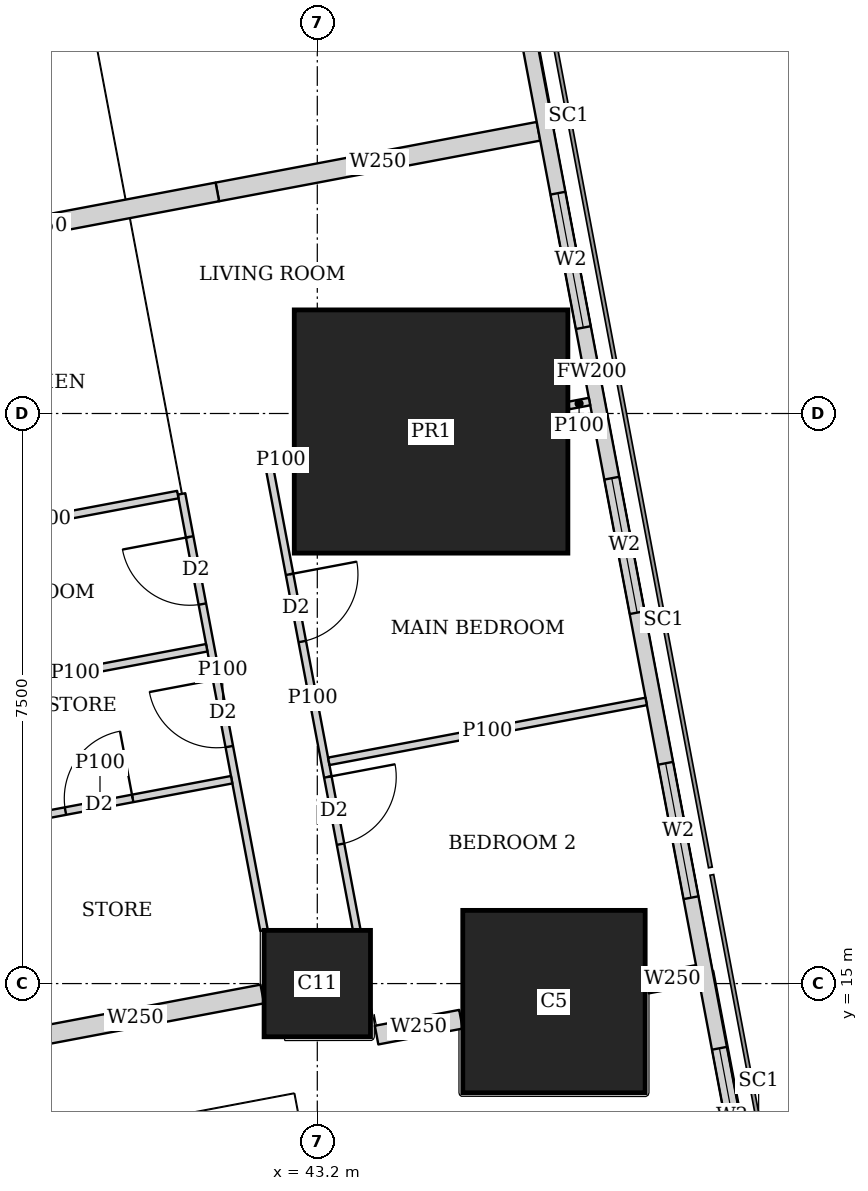
"""IFC4 building model, lengths in metres.
Left out: names, types, materials, properties, quantities, classifications, styles, units other than length and angle.
Written with IfcOpenShell. Run it as: python <this file> out.ifc"""

import sys

from ifc_helpers import new_model, si_unit, direction, frame, frame_2d, origin, origin_2d, place, context, subcontext, project, spatial, rectangle, extrude, element, fill, save


model = new_model("IFC4")
c1 = context("Model", 3, precision=1e-05, world=origin(), true_north=direction((0.0, 1.0)))
c2 = subcontext(c1, "Body", "Model", "MODEL_VIEW")
j1 = project(units=[si_unit("LENGTHUNIT", "METRE"), si_unit("PLANEANGLEUNIT", "RADIAN")], contexts=[c1])
p1 = place(None, origin())
s1 = spatial("IfcSite", under=j1, at=p1, CompositionType="ELEMENT")
p2 = place(p1, origin())
s2 = spatial("IfcBuilding", under=s1, at=p2, CompositionType="ELEMENT")
p3 = place(p2, frame((0.0, 0.0, 223.7)))
s3 = spatial("IfcBuildingStorey", under=s2, at=p3, CompositionType="ELEMENT", Elevation=223.7)
p4 = place(p3, frame((43.2, 15.0, 0.0), z_axis=(0.0, 0.0, 1.0), x_axis=(1.0, 0.0, 0.0)))
e1 = element("IfcColumn", 1, at=p4, inside=s3, PredefinedType="COLUMN", context=c2, shape_type="SweptSolid", body=[
    extrude(rectangle(XDim=1.4, YDim=1.4, at=origin_2d()), origin(), (0.0, 0.0, 1.0), 3.75),
])
p5 = place(p3, frame((46.314, 14.763, 0.0), z_axis=(0.0, 0.0, 1.0), x_axis=(1.0, 0.0, 0.0)))
e2 = element("IfcColumn", 2, at=p5, inside=s3, PredefinedType="COLUMN", context=c2, shape_type="SweptSolid", body=[
    extrude(rectangle(XDim=2.4, YDim=2.4, at=origin_2d()), origin(), (0.0, 0.0, 1.0), 3.75),
])
p6 = place(p3, frame((44.697, 22.263, 0.0), z_axis=(0.0, 0.0, 1.0), x_axis=(1.0, 0.0, 0.0)))
e3 = element("IfcColumn", 3, at=p6, inside=s3, PredefinedType="COLUMN", context=c2, shape_type="SweptSolid", body=[
    extrude(rectangle(XDim=3.6, YDim=3.2, at=origin_2d()), origin(), (0.0, 0.0, 1.0), 3.75),
])
p7 = place(p3, frame((50.653, 2.703, 0.0), z_axis=(0.0, 0.0, 1.0), x_axis=(-0.185612026696, 0.982623109613, 0.0)))
e4 = element("IfcWall", 4, at=p7, inside=s3, PredefinedType="SOLIDWALL", context=c2, shape_type="SweptSolid", body=[
    extrude(rectangle(XDim=41.393, YDim=0.2, at=frame_2d((20.697, 0.0))), origin(), (0.0, 0.0, 1.0), 3.5),
])
p8 = place(p7, frame((1.633, 0.0, 0.9)))
e5 = element("IfcOpeningElement", 5, at=p8, cuts=e4, PredefinedType="OPENING", context=c2, shape_type="SweptSolid", body=[
    extrude(rectangle(XDim=1.8, YDim=1.5, at=frame_2d((0.9, 0.75))), frame((0.0, 0.11, 0.0), z_axis=(0.0, -1.0, 0.0), x_axis=(1.0, 0.0, 0.0)), (0.0, 0.0, 1.0), 0.22),
])
p9 = place(p7, frame((6.032, 0.0, 0.9)))
e6 = element("IfcOpeningElement", 6, at=p9, cuts=e4, PredefinedType="OPENING", context=c2, shape_type="SweptSolid", body=[
    extrude(rectangle(XDim=1.8, YDim=1.5, at=frame_2d((0.9, 0.75))), frame((0.0, 0.11, 0.0), z_axis=(0.0, -1.0, 0.0), x_axis=(1.0, 0.0, 0.0)), (0.0, 0.0, 1.0), 0.22),
])
p10 = place(p7, frame((9.848, 0.0, 0.9)))
e7 = element("IfcOpeningElement", 7, at=p10, cuts=e4, PredefinedType="OPENING", context=c2, shape_type="SweptSolid", body=[
    extrude(rectangle(XDim=1.8, YDim=1.5, at=frame_2d((0.9, 0.75))), frame((0.0, 0.11, 0.0), z_axis=(0.0, -1.0, 0.0), x_axis=(1.0, 0.0, 0.0)), (0.0, 0.0, 1.0), 0.22),
])
p11 = place(p7, frame((13.664, 0.0, 0.9)))
e8 = element("IfcOpeningElement", 8, at=p11, cuts=e4, PredefinedType="OPENING", context=c2, shape_type="SweptSolid", body=[
    extrude(rectangle(XDim=1.8, YDim=1.5, at=frame_2d((0.9, 0.75))), frame((0.0, 0.11, 0.0), z_axis=(0.0, -1.0, 0.0), x_axis=(1.0, 0.0, 0.0)), (0.0, 0.0, 1.0), 0.22),
])
p12 = place(p7, frame((17.481, 0.0, 0.9)))
e9 = element("IfcOpeningElement", 9, at=p12, cuts=e4, PredefinedType="OPENING", context=c2, shape_type="SweptSolid", body=[
    extrude(rectangle(XDim=1.8, YDim=1.5, at=frame_2d((0.9, 0.75))), frame((0.0, 0.11, 0.0), z_axis=(0.0, -1.0, 0.0), x_axis=(1.0, 0.0, 0.0)), (0.0, 0.0, 1.0), 0.22),
])
p13 = place(p7, frame((21.297, 0.0, 0.9)))
e10 = element("IfcOpeningElement", 10, at=p13, cuts=e4, PredefinedType="OPENING", context=c2, shape_type="SweptSolid", body=[
    extrude(rectangle(XDim=1.8, YDim=1.5, at=frame_2d((0.9, 0.75))), frame((0.0, 0.11, 0.0), z_axis=(0.0, -1.0, 0.0), x_axis=(1.0, 0.0, 0.0)), (0.0, 0.0, 1.0), 0.22),
])
p14 = place(p7, frame((25.113, 0.0, 0.9)))
e11 = element("IfcOpeningElement", 11, at=p14, cuts=e4, PredefinedType="OPENING", context=c2, shape_type="SweptSolid", body=[
    extrude(rectangle(XDim=1.8, YDim=1.5, at=frame_2d((0.9, 0.75))), frame((0.0, 0.11, 0.0), z_axis=(0.0, -1.0, 0.0), x_axis=(1.0, 0.0, 0.0)), (0.0, 0.0, 1.0), 0.22),
])
p15 = place(p7, frame((28.93, 0.0, 0.9)))
e12 = element("IfcOpeningElement", 12, at=p15, cuts=e4, PredefinedType="OPENING", context=c2, shape_type="SweptSolid", body=[
    extrude(rectangle(XDim=1.8, YDim=1.5, at=frame_2d((0.9, 0.75))), frame((0.0, 0.11, 0.0), z_axis=(0.0, -1.0, 0.0), x_axis=(1.0, 0.0, 0.0)), (0.0, 0.0, 1.0), 0.22),
])
p16 = place(p7, frame((32.746, 0.0, 0.9)))
e13 = element("IfcOpeningElement", 13, at=p16, cuts=e4, PredefinedType="OPENING", context=c2, shape_type="SweptSolid", body=[
    extrude(rectangle(XDim=1.8, YDim=1.5, at=frame_2d((0.9, 0.75))), frame((0.0, 0.11, 0.0), z_axis=(0.0, -1.0, 0.0), x_axis=(1.0, 0.0, 0.0)), (0.0, 0.0, 1.0), 0.22),
])
p17 = place(p7, frame((36.481, 0.0, 0.9)))
e14 = element("IfcOpeningElement", 14, at=p17, cuts=e4, PredefinedType="OPENING", context=c2, shape_type="SweptSolid", body=[
    extrude(rectangle(XDim=1.8, YDim=1.5, at=frame_2d((0.9, 0.75))), frame((0.0, 0.11, 0.0), z_axis=(0.0, -1.0, 0.0), x_axis=(1.0, 0.0, 0.0)), (0.0, 0.0, 1.0), 0.22),
])
p18 = place(p3, frame((33.68, 42.723, 0.0), z_axis=(0.0, 0.0, 1.0), x_axis=(0.185601160014, -0.982625162207, 0.0)))
e15 = element("IfcWall", 15, at=p18, inside=s3, PredefinedType="SOLIDWALL", context=c2, shape_type="SweptSolid", body=[
    extrude(rectangle(XDim=41.051, YDim=0.15, at=frame_2d((20.526, 0.0))), origin(), (0.0, 0.0, 1.0), 2.5),
])
p19 = place(p18, frame((16.123, 0.0, 0.0)))
e16 = element("IfcOpeningElement", 16, at=p19, cuts=e15, PredefinedType="OPENING", context=c2, shape_type="SweptSolid", body=[
    extrude(rectangle(XDim=1.0, YDim=2.1, at=frame_2d((0.5, 1.05))), frame((0.0, 0.085, 0.0), z_axis=(0.0, -1.0, 0.0), x_axis=(1.0, 0.0, 0.0)), (0.0, 0.0, 1.0), 0.17),
])
p20 = place(p18, frame((19.938, 0.0, 0.0)))
e17 = element("IfcOpeningElement", 17, at=p20, cuts=e15, PredefinedType="OPENING", context=c2, shape_type="SweptSolid", body=[
    extrude(rectangle(XDim=1.0, YDim=2.1, at=frame_2d((0.5, 1.05))), frame((0.0, 0.085, 0.0), z_axis=(0.0, -1.0, 0.0), x_axis=(1.0, 0.0, 0.0)), (0.0, 0.0, 1.0), 0.17),
])
p21 = place(p18, frame((30.902, 0.0, 0.0)))
e18 = element("IfcOpeningElement", 18, at=p21, cuts=e15, PredefinedType="OPENING", context=c2, shape_type="SweptSolid", body=[
    extrude(rectangle(XDim=1.0, YDim=2.1, at=frame_2d((0.5, 1.05))), frame((0.0, 0.085, 0.0), z_axis=(0.0, -1.0, 0.0), x_axis=(1.0, 0.0, 0.0)), (0.0, 0.0, 1.0), 0.17),
])
p22 = place(p3, frame((42.566, 21.809, 0.0), z_axis=(0.0, 0.0, 1.0), x_axis=(0.185613526435, -0.98262282632, 0.0)))
e19 = element("IfcWall", 19, at=p22, inside=s3, PredefinedType="PARTITIONING", context=c2, shape_type="SweptSolid", body=[
    extrude(rectangle(XDim=6.207, YDim=0.1, at=frame_2d((3.104, 0.0))), origin(), (0.0, 0.0, 1.0), 2.5),
])
p23 = place(p22, frame((1.45, 0.0, 0.0)))
e20 = element("IfcOpeningElement", 20, at=p23, cuts=e19, PredefinedType="OPENING", context=c2, shape_type="SweptSolid", body=[
    extrude(rectangle(XDim=0.9, YDim=2.1, at=frame_2d((0.45, 1.05))), frame((0.0, 0.06, 0.0), z_axis=(0.0, -1.0, 0.0), x_axis=(1.0, 0.0, 0.0)), (0.0, 0.0, 1.0), 0.12),
])
p24 = place(p22, frame((4.163, 0.0, 0.0)))
e21 = element("IfcOpeningElement", 21, at=p24, cuts=e19, PredefinedType="OPENING", context=c2, shape_type="SweptSolid", body=[
    extrude(rectangle(XDim=0.9, YDim=2.1, at=frame_2d((0.45, 1.05))), frame((0.0, 0.06, 0.0), z_axis=(0.0, -1.0, 0.0), x_axis=(1.0, 0.0, 0.0)), (0.0, 0.0, 1.0), 0.12),
])
p25 = place(p3, frame((41.414, 21.442, 0.0), z_axis=(0.0, 0.0, 1.0), x_axis=(0.185698675093, -0.982606738257, 0.0)))
e22 = element("IfcWall", 22, at=p25, inside=s3, PredefinedType="PARTITIONING", context=c2, shape_type="SweptSolid", body=[
    extrude(rectangle(XDim=5.843, YDim=0.1, at=frame_2d((2.921, 0.0))), origin(), (0.0, 0.0, 1.0), 3.5),
])
p26 = place(p25, frame((0.575, 0.0, 0.0)))
e23 = element("IfcOpeningElement", 23, at=p26, cuts=e22, PredefinedType="OPENING", context=c2, shape_type="SweptSolid", body=[
    extrude(rectangle(XDim=0.9, YDim=2.1, at=frame_2d((0.45, 1.05))), frame((0.0, 0.06, 0.0), z_axis=(0.0, -1.0, 0.0), x_axis=(1.0, 0.0, 0.0)), (0.0, 0.0, 1.0), 0.12),
])
p27 = place(p25, frame((2.483, 0.0, 0.0)))
e24 = element("IfcOpeningElement", 24, at=p27, cuts=e22, PredefinedType="OPENING", context=c2, shape_type="SweptSolid", body=[
    extrude(rectangle(XDim=0.9, YDim=2.1, at=frame_2d((0.45, 1.05))), frame((0.0, 0.06, 0.0), z_axis=(0.0, -1.0, 0.0), x_axis=(1.0, 0.0, 0.0)), (0.0, 0.0, 1.0), 0.12),
])
p28 = place(p3, frame((46.782, 22.657, 0.0), z_axis=(0.0, 0.0, 1.0), x_axis=(-0.982574553168, -0.185868898601, 0.0)))
e25 = element("IfcWall", 25, at=p28, inside=s3, PredefinedType="PARTITIONING", context=c2, shape_type="SweptSolid", body=[
    extrude(rectangle(XDim=0.28, YDim=0.1, at=frame_2d((0.14, 0.0))), origin(), (0.0, 0.0, 1.0), 3.5),
])
p29 = place(p3, frame((42.887, 21.921, 0.0), z_axis=(0.0, 0.0, 1.0), x_axis=(-0.982274918032, -0.187445953293, 0.0)))
e26 = element("IfcWall", 26, at=p29, inside=s3, PredefinedType="PARTITIONING", context=c2, shape_type="SweptSolid", body=[
    extrude(rectangle(XDim=0.336, YDim=0.1, at=frame_2d((0.168, 0.0))), origin(), (0.0, 0.0, 1.0), 2.5),
])
p30 = place(p3, frame((47.527, 18.712, 0.0), z_axis=(0.0, 0.0, 1.0), x_axis=(-0.982665405803, -0.185387972203, 0.0)))
e27 = element("IfcWall", 27, at=p30, inside=s3, PredefinedType="PARTITIONING", context=c2, shape_type="SweptSolid", body=[
    extrude(rectangle(XDim=4.25, YDim=0.1, at=frame_2d((2.125, 0.0))), origin(), (0.0, 0.0, 1.0), 2.05),
])
p31 = place(p3, frame((41.365, 21.433, 0.0), z_axis=(0.0, 0.0, 1.0), x_axis=(-0.982638553676, -0.185530247748, 0.0)))
e28 = element("IfcWall", 28, at=p31, inside=s3, PredefinedType="PARTITIONING", context=c2, shape_type="SweptSolid", body=[
    extrude(rectangle(XDim=3.525, YDim=0.1, at=frame_2d((1.763, 0.0))), origin(), (0.0, 0.0, 1.0), 3.5),
])
p32 = place(p3, frame((42.073, 17.682, 0.0), z_axis=(0.0, 0.0, 1.0), x_axis=(-0.98265117712, -0.185463376723, 0.0)))
e29 = element("IfcWall", 29, at=p32, inside=s3, PredefinedType="PARTITIONING", context=c2, shape_type="SweptSolid", body=[
    extrude(rectangle(XDim=3.525, YDim=0.1, at=frame_2d((1.763, 0.0))), origin(), (0.0, 0.0, 1.0), 3.5),
])
p33 = place(p32, frame((1.325, 0.0, 0.0)))
e30 = element("IfcOpeningElement", 30, at=p33, cuts=e29, PredefinedType="OPENING", context=c2, shape_type="SweptSolid", body=[
    extrude(rectangle(XDim=0.9, YDim=2.1, at=frame_2d((0.45, 1.05))), frame((0.0, 0.06, 0.0), z_axis=(0.0, -1.0, 0.0), x_axis=(1.0, 0.0, 0.0)), (0.0, 0.0, 1.0), 0.12),
])
p34 = place(p3, frame((41.745, 19.418, 0.0), z_axis=(0.0, 0.0, 1.0), x_axis=(-0.982638553676, -0.185530247748, 0.0)))
e31 = element("IfcWall", 31, at=p34, inside=s3, PredefinedType="PARTITIONING", context=c2, shape_type="SweptSolid", body=[
    extrude(rectangle(XDim=3.525, YDim=0.1, at=frame_2d((1.763, 0.0))), origin(), (0.0, 0.0, 1.0), 3.5),
])
p35 = place(p3, frame((46.11, 26.213, 0.0), z_axis=(0.0, 0.0, 1.0), x_axis=(-0.982633535512, -0.185556823879, 0.0)))
e32 = element("IfcWall", 32, at=p35, inside=s3, PredefinedType="SOLIDWALL", context=c2, shape_type="SweptSolid", body=[
    extrude(rectangle(XDim=4.3, YDim=0.25, at=frame_2d((2.15, 0.0))), origin(), (0.0, 0.0, 1.0), 2.05),
])
p36 = place(p3, frame((41.885, 25.415, 0.0), z_axis=(0.0, 0.0, 1.0), x_axis=(-0.982596737686, -0.185751584349, 0.0)))
e33 = element("IfcWall", 33, at=p36, inside=s3, PredefinedType="SOLIDWALL", context=c2, shape_type="SweptSolid", body=[
    extrude(rectangle(XDim=4.775, YDim=0.25, at=frame_2d((2.387, 0.0))), origin(), (0.0, 0.0, 1.0), 3.5),
])
p37 = place(p3, frame((48.206, 15.12, 0.0), z_axis=(0.0, 0.0, 1.0), x_axis=(-0.982610999048, -0.18567612811, 0.0)))
e34 = element("IfcWall", 34, at=p37, inside=s3, PredefinedType="SOLIDWALL", context=c2, shape_type="SweptSolid", body=[
    extrude(rectangle(XDim=0.68, YDim=0.25, at=frame_2d((0.34, 0.0))), origin(), (0.0, 0.0, 1.0), 2.05),
])
p38 = place(p3, frame((45.09, 14.531, 0.0), z_axis=(0.0, 0.0, 1.0), x_axis=(-0.982737354171, -0.185006196431, 0.0)))
e35 = element("IfcWall", 35, at=p38, inside=s3, PredefinedType="SOLIDWALL", context=c2, shape_type="SweptSolid", body=[
    extrude(rectangle(XDim=1.13, YDim=0.25, at=frame_2d((0.565, 0.0))), origin(), (0.0, 0.0, 1.0), 2.05),
])
p39 = place(p3, frame((42.476, 14.863, 0.0), z_axis=(0.0, 0.0, 1.0), x_axis=(-0.982603567712, -0.185715450942, 0.0)))
e36 = element("IfcWall", 36, at=p39, inside=s3, PredefinedType="SOLIDWALL", context=c2, shape_type="SweptSolid", body=[
    extrude(rectangle(XDim=3.398, YDim=0.25, at=frame_2d((1.699, 0.0))), origin(), (0.0, 0.0, 1.0), 3.5),
])
p40 = place(p10, origin())
e37 = element("IfcWindow", 37, at=p40, inside=s3, PartitioningType="SINGLE_PANEL", PredefinedType="WINDOW", context=c2, shape_type="SweptSolid", body=[
    extrude(rectangle(XDim=1.8, YDim=1.5, at=frame_2d((0.9, 0.75))), frame((0.0, 0.03, 0.0), z_axis=(0.0, -1.0, 0.0), x_axis=(1.0, 0.0, 0.0)), (0.0, 0.0, 1.0), 0.06),
])
fill(e7, e37)
p41 = place(p11, origin())
e38 = element("IfcWindow", 38, at=p41, inside=s3, PartitioningType="SINGLE_PANEL", PredefinedType="WINDOW", context=c2, shape_type="SweptSolid", body=[
    extrude(rectangle(XDim=1.8, YDim=1.5, at=frame_2d((0.9, 0.75))), frame((0.0, 0.03, 0.0), z_axis=(0.0, -1.0, 0.0), x_axis=(1.0, 0.0, 0.0)), (0.0, 0.0, 1.0), 0.06),
])
fill(e8, e38)
p42 = place(p12, origin())
e39 = element("IfcWindow", 39, at=p42, inside=s3, PartitioningType="SINGLE_PANEL", PredefinedType="WINDOW", context=c2, shape_type="SweptSolid", body=[
    extrude(rectangle(XDim=1.8, YDim=1.5, at=frame_2d((0.9, 0.75))), frame((0.0, 0.03, 0.0), z_axis=(0.0, -1.0, 0.0), x_axis=(1.0, 0.0, 0.0)), (0.0, 0.0, 1.0), 0.06),
])
fill(e9, e39)
p43 = place(p13, origin())
e40 = element("IfcWindow", 40, at=p43, inside=s3, PartitioningType="SINGLE_PANEL", PredefinedType="WINDOW", context=c2, shape_type="SweptSolid", body=[
    extrude(rectangle(XDim=1.8, YDim=1.5, at=frame_2d((0.9, 0.75))), frame((0.0, 0.03, 0.0), z_axis=(0.0, -1.0, 0.0), x_axis=(1.0, 0.0, 0.0)), (0.0, 0.0, 1.0), 0.06),
])
fill(e10, e40)
p44 = place(p23, origin())
e41 = element("IfcDoor", 41, at=p44, inside=s3, OperationType="SINGLE_SWING_LEFT", PredefinedType="DOOR", context=c2, shape_type="SweptSolid", body=[
    extrude(rectangle(XDim=0.9, YDim=2.1, at=frame_2d((0.45, 1.05))), frame((0.0, 0.025, 0.0), z_axis=(0.0, -1.0, 0.0), x_axis=(1.0, 0.0, 0.0)), (0.0, 0.0, 1.0), 0.05),
])
fill(e20, e41)
p45 = place(p24, origin())
e42 = element("IfcDoor", 42, at=p45, inside=s3, OperationType="SINGLE_SWING_LEFT", PredefinedType="DOOR", context=c2, shape_type="SweptSolid", body=[
    extrude(rectangle(XDim=0.9, YDim=2.1, at=frame_2d((0.45, 1.05))), frame((0.0, 0.025, 0.0), z_axis=(0.0, -1.0, 0.0), x_axis=(1.0, 0.0, 0.0)), (0.0, 0.0, 1.0), 0.05),
])
fill(e21, e42)
p46 = place(p26, origin())
e43 = element("IfcDoor", 43, at=p46, inside=s3, OperationType="SINGLE_SWING_RIGHT", PredefinedType="DOOR", context=c2, shape_type="SweptSolid", body=[
    extrude(rectangle(XDim=0.9, YDim=2.1, at=frame_2d((0.45, 1.05))), frame((0.0, 0.025, 0.0), z_axis=(0.0, -1.0, 0.0), x_axis=(1.0, 0.0, 0.0)), (0.0, 0.0, 1.0), 0.05),
])
fill(e23, e43)
p47 = place(p27, origin())
e44 = element("IfcDoor", 44, at=p47, inside=s3, OperationType="SINGLE_SWING_RIGHT", PredefinedType="DOOR", context=c2, shape_type="SweptSolid", body=[
    extrude(rectangle(XDim=0.9, YDim=2.1, at=frame_2d((0.45, 1.05))), frame((0.0, 0.025, 0.0), z_axis=(0.0, -1.0, 0.0), x_axis=(1.0, 0.0, 0.0)), (0.0, 0.0, 1.0), 0.05),
])
fill(e24, e44)
p48 = place(p33, origin())
e45 = element("IfcDoor", 45, at=p48, inside=s3, OperationType="SINGLE_SWING_RIGHT", PredefinedType="DOOR", context=c2, shape_type="SweptSolid", body=[
    extrude(rectangle(XDim=0.9, YDim=2.1, at=frame_2d((0.45, 1.05))), frame((0.0, 0.025, 0.0), z_axis=(0.0, -1.0, 0.0), x_axis=(1.0, 0.0, 0.0)), (0.0, 0.0, 1.0), 0.05),
])
fill(e30, e45)
save(model, sys.argv[1])
